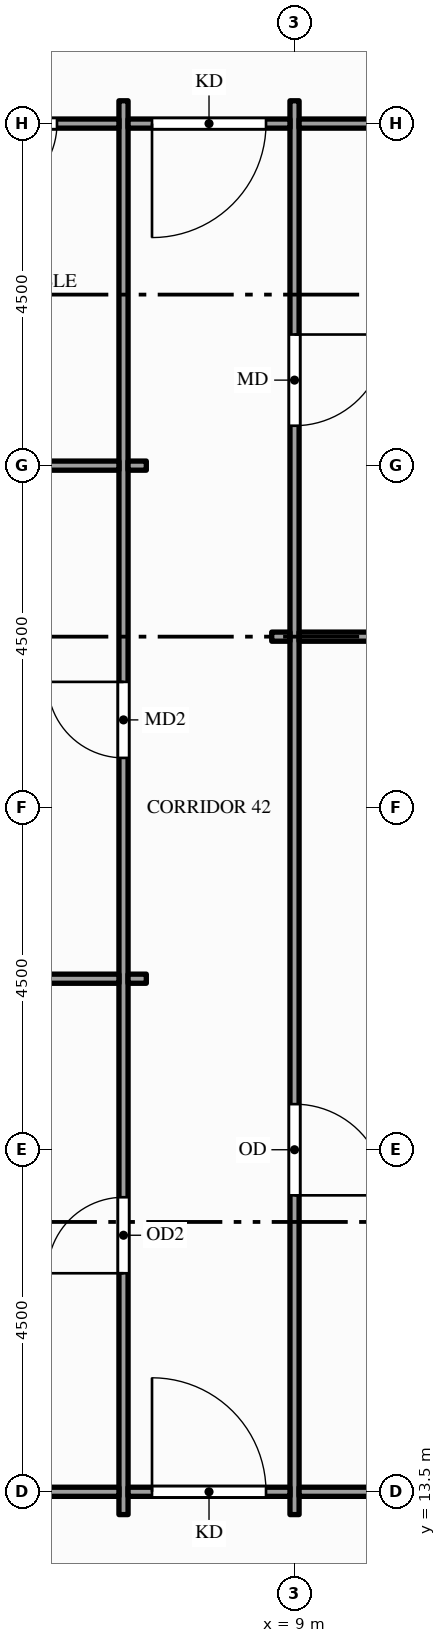
"""IFC4 building model, lengths in metres.
Left out: names, types, materials, properties, quantities, classifications, styles, units other than length and angle.
Written with IfcOpenShell. Run it as: python <this file> out.ifc"""

import sys

from ifc_helpers import new_model, si_unit, direction, frame, frame_2d, origin, place, context, subcontext, project, spatial, rectangle, extrude, element, fill, save


model = new_model("IFC4")
c1 = context("Model", 3, precision=1e-05, world=origin(), true_north=direction((0.0, 1.0)))
c2 = subcontext(c1, "Body", "Model", "MODEL_VIEW")
j1 = project(units=[si_unit("LENGTHUNIT", "METRE"), si_unit("PLANEANGLEUNIT", "RADIAN")], contexts=[c1])
p1 = place(None, origin())
s1 = spatial("IfcSite", under=j1, at=p1, CompositionType="ELEMENT")
p2 = place(p1, origin())
s2 = spatial("IfcBuilding", under=s1, at=p2, CompositionType="ELEMENT")
p3 = place(p2, frame((0.0, 0.0, 41.0)))
s3 = spatial("IfcBuildingStorey", under=s2, at=p3, CompositionType="ELEMENT", Elevation=41.0)
p4 = place(p3, frame((6.75, 13.2, 0.0), z_axis=(0.0, 0.0, 1.0), x_axis=(0.0, 1.0, 0.0)))
e1 = element("IfcWall", 1, at=p4, inside=s3, PredefinedType="PARTITIONING", context=c2, shape_type="SweptSolid", body=[
    extrude(rectangle(XDim=18.6, YDim=0.12, at=frame_2d((9.3, 0.0))), origin(), (0.0, 0.0, 1.0), 2.6),
])
p5 = place(p4, frame((3.175, 0.0, 0.0)))
e2 = element("IfcOpeningElement", 2, at=p5, cuts=e1, PredefinedType="OPENING", context=c2, shape_type="SweptSolid", body=[
    extrude(rectangle(XDim=1.0, YDim=2.1, at=frame_2d((0.5, 1.05))), frame((0.0, 0.07, 0.0), z_axis=(0.0, -1.0, 0.0), x_axis=(1.0, 0.0, 0.0)), (0.0, 0.0, 1.0), 0.14),
])
p6 = place(p4, frame((9.955, 0.0, 0.0)))
e3 = element("IfcOpeningElement", 3, at=p6, cuts=e1, PredefinedType="OPENING", context=c2, shape_type="SweptSolid", body=[
    extrude(rectangle(XDim=1.0, YDim=2.1, at=frame_2d((0.5, 1.05))), frame((0.0, 0.07, 0.0), z_axis=(0.0, -1.0, 0.0), x_axis=(1.0, 0.0, 0.0)), (0.0, 0.0, 1.0), 0.14),
])
p7 = place(p3, frame((9.0, 13.2, 0.0), z_axis=(0.0, 0.0, 1.0), x_axis=(0.0, 1.0, 0.0)))
e4 = element("IfcWall", 4, at=p7, inside=s3, PredefinedType="PARTITIONING", context=c2, shape_type="SweptSolid", body=[
    extrude(rectangle(XDim=18.6, YDim=0.12, at=frame_2d((9.3, 0.0))), origin(), (0.0, 0.0, 1.0), 2.6),
])
p8 = place(p7, frame((14.325, 0.0, 0.0)))
e5 = element("IfcOpeningElement", 5, at=p8, cuts=e4, PredefinedType="OPENING", context=c2, shape_type="SweptSolid", body=[
    extrude(rectangle(XDim=1.2, YDim=2.1, at=frame_2d((0.6, 1.05))), frame((0.0, 0.07, 0.0), z_axis=(0.0, -1.0, 0.0), x_axis=(1.0, 0.0, 0.0)), (0.0, 0.0, 1.0), 0.14),
])
p9 = place(p7, frame((4.2, 0.0, 0.0)))
e6 = element("IfcOpeningElement", 6, at=p9, cuts=e4, PredefinedType="OPENING", context=c2, shape_type="SweptSolid", body=[
    extrude(rectangle(XDim=1.2, YDim=2.1, at=frame_2d((0.6, 1.05))), frame((0.0, 0.07, 0.0), z_axis=(0.0, -1.0, 0.0), x_axis=(1.0, 0.0, 0.0)), (0.0, 0.0, 1.0), 0.14),
])
p10 = place(p3, frame((0.15, 13.5, 0.0), z_axis=(0.0, 0.0, 1.0), x_axis=(1.0, 0.0, 0.0)))
e7 = element("IfcWall", 7, at=p10, inside=s3, PredefinedType="PARTITIONING", context=c2, shape_type="SweptSolid", body=[
    extrude(rectangle(XDim=6.54, YDim=0.12, at=frame_2d((3.27, 0.0))), origin(), (0.0, 0.0, 1.0), 2.938),
])
p11 = place(p3, frame((6.81, 13.5, 0.0), z_axis=(0.0, 0.0, 1.0), x_axis=(1.0, 0.0, 0.0)))
e8 = element("IfcWall", 8, at=p11, inside=s3, PredefinedType="PARTITIONING", context=c2, shape_type="SweptSolid", body=[
    extrude(rectangle(XDim=2.13, YDim=0.12, at=frame_2d((1.065, 0.0))), origin(), (0.0, 0.0, 1.0), 2.938),
])
p12 = place(p11, frame((0.315, 0.0, 0.0)))
e9 = element("IfcOpeningElement", 9, at=p12, cuts=e8, PredefinedType="OPENING", context=c2, shape_type="SweptSolid", body=[
    extrude(rectangle(XDim=1.5, YDim=2.1, at=frame_2d((0.75, 1.05))), frame((0.0, 0.07, 0.0), z_axis=(0.0, -1.0, 0.0), x_axis=(1.0, 0.0, 0.0)), (0.0, 0.0, 1.0), 0.14),
])
p13 = place(p3, frame((9.06, 13.5, 0.0), z_axis=(0.0, 0.0, 1.0), x_axis=(1.0, 0.0, 0.0)))
e10 = element("IfcWall", 10, at=p13, inside=s3, PredefinedType="PARTITIONING", context=c2, shape_type="SweptSolid", body=[
    extrude(rectangle(XDim=20.13, YDim=0.12, at=frame_2d((10.065, 0.0))), origin(), (0.0, 0.0, 1.0), 2.938),
])
p14 = place(p13, frame((3.54, 0.0, 0.0)))
e11 = element("IfcOpeningElement", 11, at=p14, cuts=e10, PredefinedType="OPENING", context=c2, shape_type="SweptSolid", body=[
    extrude(rectangle(XDim=1.8, YDim=2.1, at=frame_2d((0.9, 1.05))), frame((0.0, 0.07, 0.0), z_axis=(0.0, -1.0, 0.0), x_axis=(1.0, 0.0, 0.0)), (0.0, 0.0, 1.0), 0.14),
])
p15 = place(p3, frame((0.15, 20.25, 0.0), z_axis=(0.0, 0.0, 1.0), x_axis=(1.0, 0.0, 0.0)))
e12 = element("IfcWall", 12, at=p15, inside=s3, PredefinedType="PARTITIONING", context=c2, shape_type="SweptSolid", body=[
    extrude(rectangle(XDim=6.54, YDim=0.12, at=frame_2d((3.27, 0.0))), origin(), (0.0, 0.0, 1.0), 2.938),
])
for number, where, z_axis, x_axis in (
    (13, (6.81, 20.25, 0.0), (0.0, 0.0, 1.0), (1.0, 0.0, 0.0)),
    (14, (8.7, 24.75, 0.0), (0.0, 0.0, 1.0), (1.0, 0.0, 0.0)),
):
    element("IfcWall", number, at=place(p3, frame(where, z_axis=z_axis, x_axis=x_axis)), inside=s3, PredefinedType="PARTITIONING", context=c2, shape_type="SweptSolid", body=[
        extrude(rectangle(XDim=0.24, YDim=0.12, at=frame_2d((0.12, 0.0))), origin(), (0.0, 0.0, 1.0), 2.938),
    ])
p16 = place(p3, frame((9.06, 24.75, 0.0), z_axis=(0.0, 0.0, 1.0), x_axis=(1.0, 0.0, 0.0)))
e15 = element("IfcWall", 15, at=p16, inside=s3, PredefinedType="PARTITIONING", context=c2, shape_type="SweptSolid", body=[
    extrude(rectangle(XDim=13.69, YDim=0.12, at=frame_2d((6.845, 0.0))), origin(), (0.0, 0.0, 1.0), 2.938),
])
p17 = place(p3, frame((4.06, 27.0, 0.0), z_axis=(0.0, 0.0, 1.0), x_axis=(1.0, 0.0, 0.0)))
e16 = element("IfcWall", 16, at=p17, inside=s3, PredefinedType="PARTITIONING", context=c2, shape_type="SweptSolid", body=[
    extrude(rectangle(XDim=2.63, YDim=0.12, at=frame_2d((1.315, 0.0))), origin(), (0.0, 0.0, 1.0), 2.938),
])
p18 = place(p3, frame((6.81, 27.0, 0.0), z_axis=(0.0, 0.0, 1.0), x_axis=(1.0, 0.0, 0.0)))
e17 = element("IfcWall", 17, at=p18, inside=s3, PredefinedType="PARTITIONING", context=c2, shape_type="SweptSolid", body=[
    extrude(rectangle(XDim=0.24, YDim=0.12, at=frame_2d((0.12, 0.0))), origin(), (0.0, 0.0, 1.0), 2.938),
])
p19 = place(p3, frame((4.06, 31.5, 0.0), z_axis=(0.0, 0.0, 1.0), x_axis=(1.0, 0.0, 0.0)))
e18 = element("IfcWall", 18, at=p19, inside=s3, PredefinedType="PARTITIONING", context=c2, shape_type="SweptSolid", body=[
    extrude(rectangle(XDim=2.63, YDim=0.12, at=frame_2d((1.315, 0.0))), origin(), (0.0, 0.0, 1.0), 2.938),
])
p20 = place(p19, frame((0.815, 0.0, 0.0)))
e19 = element("IfcOpeningElement", 19, at=p20, cuts=e18, PredefinedType="OPENING", context=c2, shape_type="SweptSolid", body=[
    extrude(rectangle(XDim=1.0, YDim=2.1, at=frame_2d((0.5, 1.05))), frame((0.0, 0.07, 0.0), z_axis=(0.0, -1.0, 0.0), x_axis=(1.0, 0.0, 0.0)), (0.0, 0.0, 1.0), 0.14),
])
p21 = place(p3, frame((6.81, 31.5, 0.0), z_axis=(0.0, 0.0, 1.0), x_axis=(1.0, 0.0, 0.0)))
e20 = element("IfcWall", 20, at=p21, inside=s3, PredefinedType="PARTITIONING", context=c2, shape_type="SweptSolid", body=[
    extrude(rectangle(XDim=2.13, YDim=0.12, at=frame_2d((1.065, 0.0))), origin(), (0.0, 0.0, 1.0), 2.938),
])
p22 = place(p21, frame((0.315, 0.0, 0.0)))
e21 = element("IfcOpeningElement", 21, at=p22, cuts=e20, PredefinedType="OPENING", context=c2, shape_type="SweptSolid", body=[
    extrude(rectangle(XDim=1.5, YDim=2.1, at=frame_2d((0.75, 1.05))), frame((0.0, 0.07, 0.0), z_axis=(0.0, -1.0, 0.0), x_axis=(1.0, 0.0, 0.0)), (0.0, 0.0, 1.0), 0.14),
])
p23 = place(p3, frame((9.06, 31.5, 0.0), z_axis=(0.0, 0.0, 1.0), x_axis=(1.0, 0.0, 0.0)))
e22 = element("IfcWall", 22, at=p23, inside=s3, PredefinedType="PARTITIONING", context=c2, shape_type="SweptSolid", body=[
    extrude(rectangle(XDim=11.79, YDim=0.12, at=frame_2d((5.895, 0.0))), origin(), (0.0, 0.0, 1.0), 2.938),
])
p24 = place(p12, origin())
e23 = element("IfcDoor", 23, at=p24, inside=s3, OperationType="SINGLE_SWING_LEFT", PredefinedType="DOOR", context=c2, shape_type="SweptSolid", body=[
    extrude(rectangle(XDim=1.5, YDim=2.1, at=frame_2d((0.75, 1.05))), frame((0.0, 0.025, 0.0), z_axis=(0.0, -1.0, 0.0), x_axis=(1.0, 0.0, 0.0)), (0.0, 0.0, 1.0), 0.05),
])
fill(e9, e23)
p25 = place(p22, origin())
e24 = element("IfcDoor", 24, at=p25, inside=s3, OperationType="SINGLE_SWING_LEFT", PredefinedType="DOOR", context=c2, shape_type="SweptSolid", body=[
    extrude(rectangle(XDim=1.5, YDim=2.1, at=frame_2d((0.75, 1.05))), frame((0.0, 0.025, 0.0), z_axis=(0.0, -1.0, 0.0), x_axis=(1.0, 0.0, 0.0)), (0.0, 0.0, 1.0), 0.05),
])
fill(e21, e24)
p26 = place(p5, origin())
e25 = element("IfcDoor", 25, at=p26, inside=s3, OperationType="SINGLE_SWING_LEFT", PredefinedType="DOOR", context=c2, shape_type="SweptSolid", body=[
    extrude(rectangle(XDim=1.0, YDim=2.1, at=frame_2d((0.5, 1.05))), frame((0.0, 0.025, 0.0), z_axis=(0.0, -1.0, 0.0), x_axis=(1.0, 0.0, 0.0)), (0.0, 0.0, 1.0), 0.05),
])
fill(e2, e25)
p27 = place(p6, origin())
e26 = element("IfcDoor", 26, at=p27, inside=s3, OperationType="SINGLE_SWING_RIGHT", PredefinedType="DOOR", context=c2, shape_type="SweptSolid", body=[
    extrude(rectangle(XDim=1.0, YDim=2.1, at=frame_2d((0.5, 1.05))), frame((0.0, 0.025, 0.0), z_axis=(0.0, -1.0, 0.0), x_axis=(1.0, 0.0, 0.0)), (0.0, 0.0, 1.0), 0.05),
])
fill(e3, e26)
p28 = place(p20, origin())
e27 = element("IfcDoor", 27, at=p28, inside=s3, OperationType="SINGLE_SWING_LEFT", PredefinedType="DOOR", context=c2, shape_type="SweptSolid", body=[
    extrude(rectangle(XDim=1.0, YDim=2.1, at=frame_2d((0.5, 1.05))), frame((0.0, 0.025, 0.0), z_axis=(0.0, -1.0, 0.0), x_axis=(1.0, 0.0, 0.0)), (0.0, 0.0, 1.0), 0.05),
])
fill(e19, e27)
p29 = place(p8, origin())
e28 = element("IfcDoor", 28, at=p29, inside=s3, OperationType="SINGLE_SWING_RIGHT", PredefinedType="DOOR", context=c2, shape_type="SweptSolid", body=[
    extrude(rectangle(XDim=1.2, YDim=2.1, at=frame_2d((0.6, 1.05))), frame((0.0, 0.025, 0.0), z_axis=(0.0, -1.0, 0.0), x_axis=(1.0, 0.0, 0.0)), (0.0, 0.0, 1.0), 0.05),
])
fill(e5, e28)
p30 = place(p9, origin())
e29 = element("IfcDoor", 29, at=p30, inside=s3, OperationType="SINGLE_SWING_LEFT", PredefinedType="DOOR", context=c2, shape_type="SweptSolid", body=[
    extrude(rectangle(XDim=1.2, YDim=2.1, at=frame_2d((0.6, 1.05))), frame((0.0, 0.025, 0.0), z_axis=(0.0, -1.0, 0.0), x_axis=(1.0, 0.0, 0.0)), (0.0, 0.0, 1.0), 0.05),
])
fill(e6, e29)
save(model, sys.argv[1])
